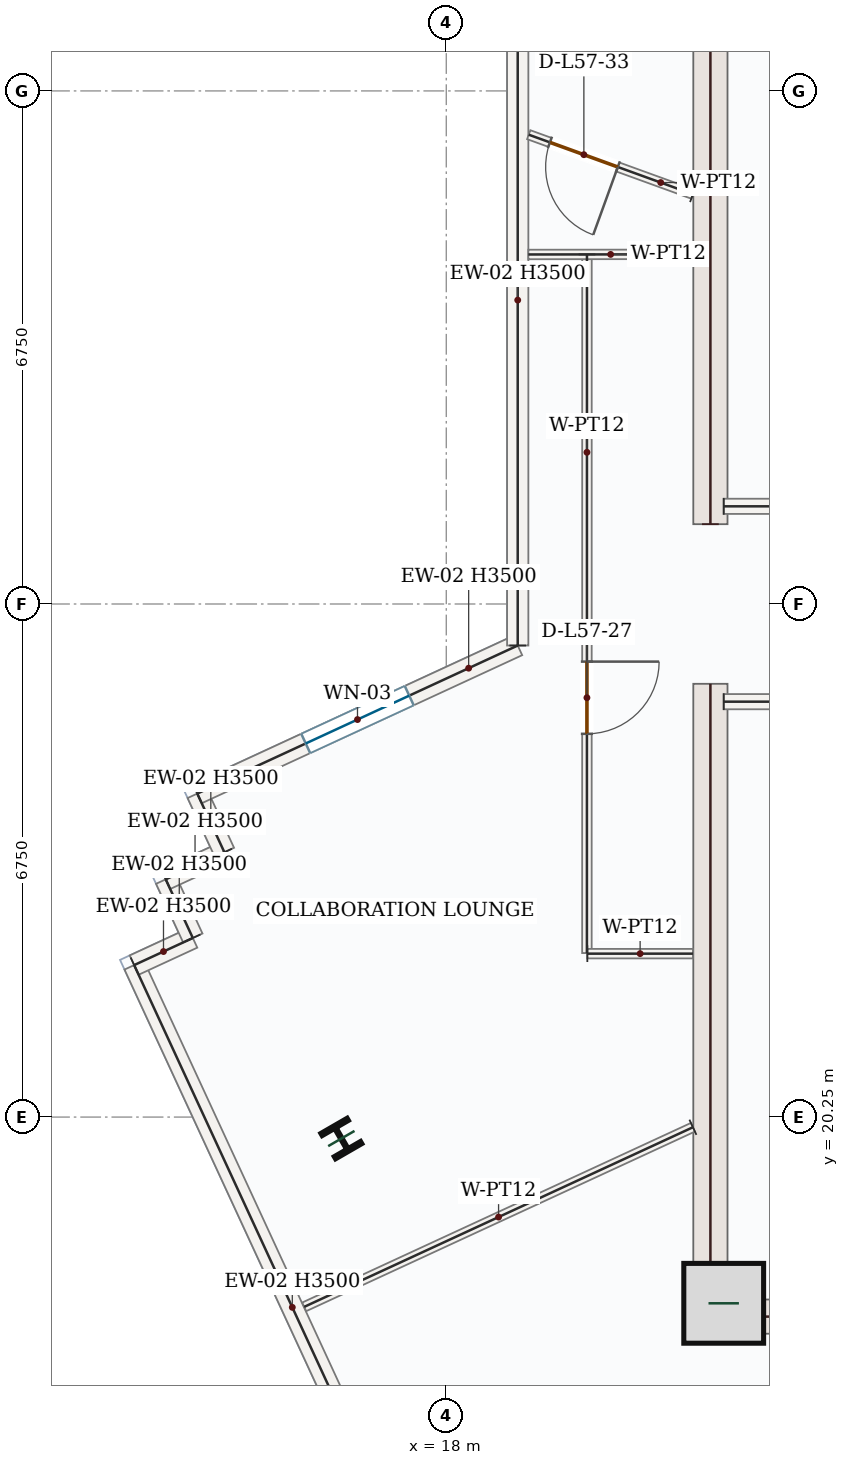
"""IFC4 building model, lengths in metres.
Left out: names, types, materials, properties, quantities, classifications, styles, units other than length and angle.
Written with IfcOpenShell. Run it as: python <this file> out.ifc"""

import sys

from ifc_helpers import new_model, si_unit, direction, frame, frame_2d, origin, origin_2d, place, context, subcontext, project, spatial, rectangle, i_section, extrude, source, transform, mapped, element, fill, save


model = new_model("IFC4")
c1 = context("Model", 3, precision=1e-05, world=origin(), true_north=direction((0.0, 1.0)))
c2 = subcontext(c1, "Body", "Model", "MODEL_VIEW")
j1 = project(units=[si_unit("LENGTHUNIT", "METRE"), si_unit("PLANEANGLEUNIT", "RADIAN")], contexts=[c1])
p1 = place(None, origin())
s1 = spatial("IfcSite", under=j1, at=p1, CompositionType="ELEMENT")
p2 = place(p1, origin())
s2 = spatial("IfcBuilding", under=s1, at=p2, CompositionType="ELEMENT")
p3 = place(p2, frame((0.0, 0.0, 242.85)))
s3 = spatial("IfcBuildingStorey", under=s2, at=p3, CompositionType="ELEMENT", Elevation=242.85)
m1 = source(origin(), c2, "Body", "SweptSolid", [
    extrude(rectangle(XDim=8.55, YDim=0.45, at=frame_2d((4.275, 0.0))), origin(), (0.0, 0.0, 1.0), 3.5),
])
for number, where, z_axis, x_axis in (
    (1, (21.475, 17.4, 0.0), (0.0, 0.0, 1.0), (0.0, 1.0, 0.0)),
    (2, (21.475, 28.05, 0.0), (0.0, 0.0, 1.0), (0.0, 1.0, 0.0)),
):
    element("IfcWall", number, at=place(p3, frame(where, z_axis=z_axis, x_axis=x_axis)), inside=s3, PredefinedType="SHEAR", context=c2, shape_type="MappedRepresentation", body=[
        mapped(m1, transform((0.0, 0.0, 0.0), x_axis=(1.0, 0.0, 0.0), y_axis=(0.0, 1.0, 0.0), z_axis=(0.0, 0.0, 1.0), scale=1.0)),
    ])
m2 = source(origin(), c2, "Body", "SweptSolid", [
    extrude(rectangle(XDim=7.1, YDim=0.45, at=frame_2d((3.55, 0.0))), origin(), (0.0, 0.0, 1.0), 3.5),
])
p4 = place(p3, frame((21.7, 17.625, 0.0), z_axis=(0.0, 0.0, 1.0), x_axis=(1.0, 0.0, 0.0)))
e3 = element("IfcWall", 3, at=p4, inside=s3, PredefinedType="SHEAR", context=c2, shape_type="MappedRepresentation", body=[
    mapped(m2, transform((0.0, 0.0, 0.0), x_axis=(1.0, 0.0, 0.0), y_axis=(0.0, 1.0, 0.0), z_axis=(0.0, 0.0, 1.0), scale=1.0)),
])
m3 = source(origin(), c2, "Body", "SweptSolid", [
    extrude(rectangle(XDim=1.05, YDim=1.05, at=origin_2d()), origin(), (0.0, 0.0, 1.0), 3.75),
])
p5 = place(p3, frame((21.65, 17.8, 0.0), z_axis=(0.0, 0.0, 1.0), x_axis=(1.0, 0.0, 0.0)))
e4 = element("IfcColumn", 4, at=p5, inside=s3, PredefinedType="COLUMN", context=c2, shape_type="MappedRepresentation", body=[
    mapped(m3, transform((0.0, 0.0, 0.0), x_axis=(1.0, 0.0, 0.0), y_axis=(0.0, 1.0, 0.0), z_axis=(0.0, 0.0, 1.0), scale=1.0)),
])
m4 = source(origin(), c2, "Body", "SweptSolid", [
    extrude(i_section(OverallWidth=0.399, OverallDepth=0.386, WebThickness=0.021, FlangeThickness=0.033, FilletRadius=0.018, at=origin_2d()), origin(), (0.0, 0.0, 1.0), 3.75),
])
p6 = place(p3, frame((16.62, 19.968, 0.0), z_axis=(0.0, 0.0, 1.0), x_axis=(0.866025403784, 0.5, 0.0)))
e5 = element("IfcColumn", 5, at=p6, inside=s3, PredefinedType="COLUMN", context=c2, shape_type="MappedRepresentation", body=[
    mapped(m4, transform((0.0, 0.0, 0.0), x_axis=(1.0, 0.0, 0.0), y_axis=(0.0, 1.0, 0.0), z_axis=(0.0, 0.0, 1.0), scale=1.0)),
])
m5 = source(origin(), c2, "Body", "SweptSolid", [
    extrude(rectangle(XDim=9.92, YDim=0.28, at=frame_2d((4.96, 0.0))), origin(), (0.0, 0.0, 1.0), 3.5),
])
p7 = place(p3, frame((18.055, 13.244, 0.0), z_axis=(0.0, 0.0, 1.0), x_axis=(-0.41946703495, 0.907770569357, 0.0)))
e6 = element("IfcWall", 6, at=p7, inside=s3, PredefinedType="SOLIDWALL", context=c2, shape_type="MappedRepresentation", body=[
    mapped(m5, transform((0.0, 0.0, 0.0), x_axis=(1.0, 0.0, 0.0), y_axis=(0.0, 1.0, 0.0), z_axis=(0.0, 0.0, 1.0), scale=1.0)),
])
m6 = source(origin(), c2, "Body", "SweptSolid", [
    extrude(rectangle(XDim=0.85, YDim=0.28, at=frame_2d((0.425, 0.0))), origin(), (0.0, 0.0, 1.0), 3.5),
])
for number, where, z_axis, x_axis in (
    (7, (13.894, 22.25, 0.0), (0.0, 0.0, 1.0), (0.908, 0.419, 0.0)),
    (8, (14.666, 22.606, 0.0), (0.0, 0.0, 1.0), (-0.419, 0.908, 0.0)),
):
    element("IfcWall", number, at=place(p3, frame(where, z_axis=z_axis, x_axis=x_axis)), inside=s3, PredefinedType="SOLIDWALL", context=c2, shape_type="MappedRepresentation", body=[
        mapped(m6, transform((0.0, 0.0, 0.0), x_axis=(1.0, 0.0, 0.0), y_axis=(0.0, 1.0, 0.0), z_axis=(0.0, 0.0, 1.0), scale=1.0)),
    ])
m7 = source(origin(), c2, "Body", "SweptSolid", [
    extrude(rectangle(XDim=0.85, YDim=0.28, at=frame_2d((0.425, 0.0))), origin(), (0.0, 0.0, 1.0), 3.5),
])
for number, where, z_axis, x_axis in (
    (9, (14.309, 23.378, 0.0), (0.0, 0.0, 1.0), (0.908, 0.419, 0.0)),
    (10, (15.081, 23.734, 0.0), (0.0, 0.0, 1.0), (-0.419, 0.908, 0.0)),
):
    element("IfcWall", number, at=place(p3, frame(where, z_axis=z_axis, x_axis=x_axis)), inside=s3, PredefinedType="SOLIDWALL", context=c2, shape_type="MappedRepresentation", body=[
        mapped(m7, transform((0.0, 0.0, 0.0), x_axis=(1.0, 0.0, 0.0), y_axis=(0.0, 1.0, 0.0), z_axis=(0.0, 0.0, 1.0), scale=1.0)),
    ])
p8 = place(p3, frame((14.724, 24.506, 0.0), z_axis=(0.0, 0.0, 1.0), x_axis=(0.907756183213, 0.419498166669, 0.0)))
e11 = element("IfcWall", 11, at=p8, inside=s3, PredefinedType="SOLIDWALL", context=c2, shape_type="SweptSolid", body=[
    extrude(rectangle(XDim=4.644, YDim=0.28, at=frame_2d((2.322, 0.0))), origin(), (0.0, 0.0, 1.0), 3.5),
])
p9 = place(p8, frame((1.572, 0.0, 0.85)))
e12 = element("IfcOpeningElement", 12, at=p9, cuts=e11, PredefinedType="OPENING", context=c2, shape_type="SweptSolid", body=[
    extrude(rectangle(XDim=1.5, YDim=1.5, at=frame_2d((0.75, 0.75))), frame((0.0, 0.15, 0.0), z_axis=(0.0, -1.0, 0.0), x_axis=(1.0, 0.0, 0.0)), (0.0, 0.0, 1.0), 0.3),
])
m8 = source(origin(), c2, "Body", "SweptSolid", [
    extrude(rectangle(XDim=9.088, YDim=0.28, at=frame_2d((4.544, 0.0))), origin(), (0.0, 0.0, 1.0), 3.5),
])
p10 = place(p3, frame((18.94, 26.454, 0.0), z_axis=(0.0, 0.0, 1.0), x_axis=(0.0, 1.0, 0.0)))
e13 = element("IfcWall", 13, at=p10, inside=s3, PredefinedType="SOLIDWALL", context=c2, shape_type="MappedRepresentation", body=[
    mapped(m8, transform((0.0, 0.0, 0.0), x_axis=(1.0, 0.0, 0.0), y_axis=(0.0, 1.0, 0.0), z_axis=(0.0, 0.0, 1.0), scale=1.0)),
])
m9 = source(origin(), c2, "Body", "SweptSolid", [
    extrude(rectangle(XDim=4.25, YDim=0.2, at=frame_2d((2.125, 0.0))), origin(), (0.0, 0.0, 1.0), 3.5),
])
for number, where, z_axis, x_axis in (
    (14, (21.65, 25.715, 0.0), (0.0, 0.0, 1.0), (1.0, 0.0, 0.0)),
    (15, (21.65, 28.285, 0.0), (0.0, 0.0, 1.0), (1.0, 0.0, 0.0)),
):
    element("IfcWall", number, at=place(p3, frame(where, z_axis=z_axis, x_axis=x_axis)), inside=s3, PredefinedType="SOLIDWALL", context=c2, shape_type="MappedRepresentation", body=[
        mapped(m9, transform((0.0, 0.0, 0.0), x_axis=(1.0, 0.0, 0.0), y_axis=(0.0, 1.0, 0.0), z_axis=(0.0, 0.0, 1.0), scale=1.0)),
    ])
p11 = place(p3, frame((21.245, 32.391, 0.0), z_axis=(0.0, 0.0, 1.0), x_axis=(-0.940115637779, 0.340855669755, 0.0)))
e16 = element("IfcWall", 16, at=p11, inside=s3, PredefinedType="PARTITIONING", context=c2, shape_type="SweptSolid", body=[
    extrude(rectangle(XDim=2.298, YDim=0.125, at=frame_2d((1.149, 0.0))), origin(), (0.0, 0.0, 1.0), 3.5),
])
p12 = place(p11, frame((1.051, 0.0, 0.0)))
e17 = element("IfcOpeningElement", 17, at=p12, cuts=e16, PredefinedType="OPENING", context=c2, shape_type="SweptSolid", body=[
    extrude(rectangle(XDim=0.95, YDim=2.15, at=frame_2d((0.475, 1.075))), frame((0.0, 0.073, 0.0), z_axis=(0.0, -1.0, 0.0), x_axis=(1.0, 0.0, 0.0)), (0.0, 0.0, 1.0), 0.145),
])
p13 = place(p3, frame((19.851, 31.599, 0.0), z_axis=(0.0, 0.0, 1.0), x_axis=(-7.9685508e-05, -0.999999996825, 0.0)))
e18 = element("IfcWall", 18, at=p13, inside=s3, PredefinedType="PARTITIONING", context=c2, shape_type="SweptSolid", body=[
    extrude(rectangle(XDim=9.191, YDim=0.125, at=frame_2d((4.596, 0.0))), origin(), (0.0, 0.0, 1.0), 3.5),
])
p14 = place(p13, frame((5.357, 0.0, 0.0)))
e19 = element("IfcOpeningElement", 19, at=p14, cuts=e18, PredefinedType="OPENING", context=c2, shape_type="SweptSolid", body=[
    extrude(rectangle(XDim=0.95, YDim=2.15, at=frame_2d((0.475, 1.075))), frame((0.0, 0.073, 0.0), z_axis=(0.0, -1.0, 0.0), x_axis=(1.0, 0.0, 0.0)), (0.0, 0.0, 1.0), 0.145),
])
m10 = source(origin(), c2, "Body", "SweptSolid", [
    extrude(rectangle(XDim=1.389, YDim=0.125, at=frame_2d((0.695, 0.0))), origin(), (0.0, 0.0, 1.0), 3.5),
])
p15 = place(p3, frame((19.856, 22.4, 0.0), z_axis=(0.0, 0.0, 1.0), x_axis=(1.0, 0.0, 0.0)))
e20 = element("IfcWall", 20, at=p15, inside=s3, PredefinedType="PARTITIONING", context=c2, shape_type="MappedRepresentation", body=[
    mapped(m10, transform((0.0, 0.0, 0.0), x_axis=(1.0, 0.0, 0.0), y_axis=(0.0, 1.0, 0.0), z_axis=(0.0, 0.0, 1.0), scale=1.0)),
])
m11 = source(origin(), c2, "Body", "SweptSolid", [
    extrude(rectangle(XDim=5.634, YDim=0.125, at=frame_2d((2.817, 0.0))), origin(), (0.0, 0.0, 1.0), 3.5),
])
p16 = place(p3, frame((21.245, 20.116, 0.0), z_axis=(0.0, 0.0, 1.0), x_axis=(-0.90777538002, -0.419456624014, 0.0)))
e21 = element("IfcWall", 21, at=p16, inside=s3, PredefinedType="PARTITIONING", context=c2, shape_type="MappedRepresentation", body=[
    mapped(m11, transform((0.0, 0.0, 0.0), x_axis=(1.0, 0.0, 0.0), y_axis=(0.0, 1.0, 0.0), z_axis=(0.0, 0.0, 1.0), scale=1.0)),
])
m12 = source(origin(), c2, "Body", "SweptSolid", [
    extrude(rectangle(XDim=2.165, YDim=0.125, at=frame_2d((1.083, 0.0))), origin(), (0.0, 0.0, 1.0), 3.5),
])
p17 = place(p3, frame((21.245, 31.6, 0.0), z_axis=(0.0, 0.0, 1.0), x_axis=(-0.999999688459, -0.000789354738, 0.0)))
e22 = element("IfcWall", 22, at=p17, inside=s3, PredefinedType="PARTITIONING", context=c2, shape_type="MappedRepresentation", body=[
    mapped(m12, transform((0.0, 0.0, 0.0), x_axis=(1.0, 0.0, 0.0), y_axis=(0.0, 1.0, 0.0), z_axis=(0.0, 0.0, 1.0), scale=1.0)),
])
m13 = source(origin(), c2, "Body", "SweptSolid", [
    extrude(rectangle(XDim=1.5, YDim=1.5, at=frame_2d((0.75, 0.75))), frame((0.0, 0.03, 0.0), z_axis=(0.0, -1.0, 0.0), x_axis=(1.0, 0.0, 0.0)), (0.0, 0.0, 1.0), 0.06),
])
p18 = place(p9, origin())
e23 = element("IfcWindow", 23, at=p18, inside=s3, PartitioningType="SINGLE_PANEL", PredefinedType="WINDOW", context=c2, shape_type="MappedRepresentation", body=[
    mapped(m13, transform((0.0, 0.0, 0.0), x_axis=(1.0, 0.0, 0.0), y_axis=(0.0, 1.0, 0.0), z_axis=(0.0, 0.0, 1.0), scale=1.0)),
])
fill(e12, e23)
m14 = source(origin(), c2, "Body", "SweptSolid", [
    extrude(rectangle(XDim=0.95, YDim=2.15, at=frame_2d((0.475, 1.075))), frame((0.0, 0.025, 0.0), z_axis=(0.0, -1.0, 0.0), x_axis=(1.0, 0.0, 0.0)), (0.0, 0.0, 1.0), 0.05),
])
p19 = place(p14, origin())
e24 = element("IfcDoor", 24, at=p19, inside=s3, OperationType="SINGLE_SWING_LEFT", PredefinedType="DOOR", context=c2, shape_type="MappedRepresentation", body=[
    mapped(m14, transform((0.0, 0.0, 0.0), x_axis=(1.0, 0.0, 0.0), y_axis=(0.0, 1.0, 0.0), z_axis=(0.0, 0.0, 1.0), scale=1.0)),
])
fill(e19, e24)
p20 = place(p12, origin())
e25 = element("IfcDoor", 25, at=p20, inside=s3, OperationType="SINGLE_SWING_LEFT", PredefinedType="DOOR", context=c2, shape_type="MappedRepresentation", body=[
    mapped(m14, transform((0.0, 0.0, 0.0), x_axis=(1.0, 0.0, 0.0), y_axis=(0.0, 1.0, 0.0), z_axis=(0.0, 0.0, 1.0), scale=1.0)),
])
fill(e17, e25)
save(model, sys.argv[1])
